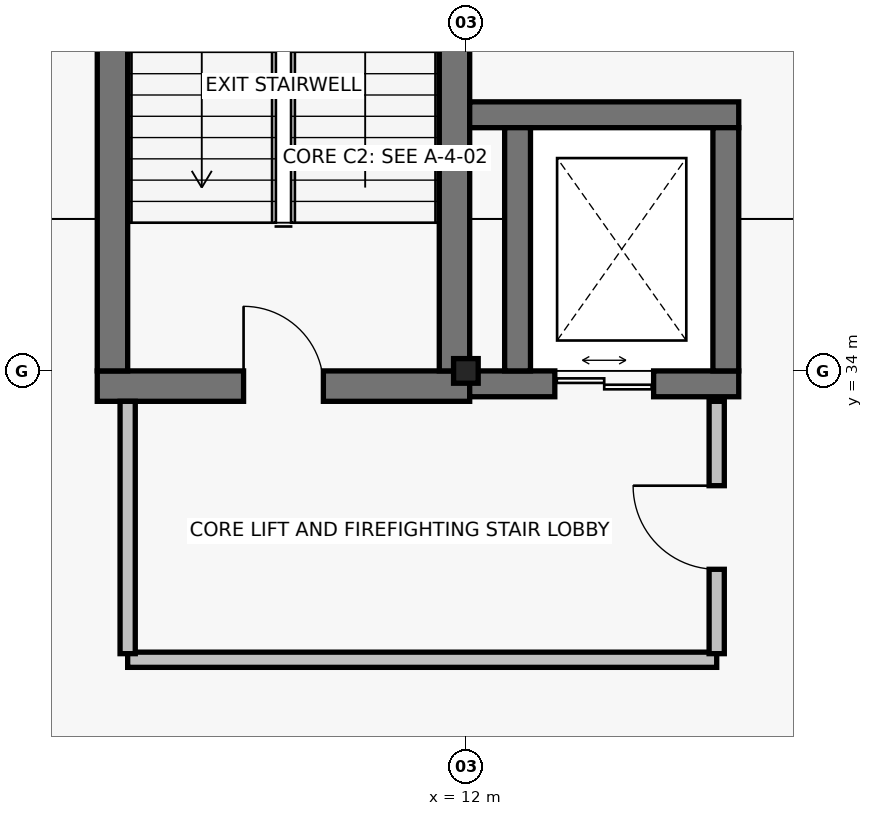
"""IFC4 building model, lengths in metres.
Left out: names, types, materials, properties, quantities, classifications, styles, units other than length and angle.
Written with IfcOpenShell. Run it as: python <this file> out.ifc"""

import sys

from ifc_helpers import new_model, si_unit, direction, frame, frame_2d, origin, origin_2d, place, context, subcontext, project, spatial, rectangle, hollow_circle, extrude, element, fill, save


model = new_model("IFC4")
c1 = context("Model", 3, precision=1e-05, world=origin(), true_north=direction((0.0, 1.0)))
c2 = subcontext(c1, "Body", "Model", "MODEL_VIEW")
j1 = project(units=[si_unit("LENGTHUNIT", "METRE"), si_unit("PLANEANGLEUNIT", "RADIAN")], contexts=[c1])
p1 = place(None, origin())
s1 = spatial("IfcSite", under=j1, at=p1, CompositionType="ELEMENT")
p2 = place(p1, origin())
s2 = spatial("IfcBuilding", under=s1, at=p2, CompositionType="ELEMENT")
p3 = place(p2, frame((0.0, 0.0, 19.4)))
s3 = spatial("IfcBuildingStorey", under=s2, at=p3, CompositionType="ELEMENT", Elevation=19.4)
p4 = place(p3, frame((12.0, 34.0, 0.0), z_axis=(0.0, 0.0, 1.0), x_axis=(1.0, 0.0, 0.0)))
e1 = element("IfcColumn", 1, at=p4, inside=s3, PredefinedType="COLUMN", context=c2, shape_type="SweptSolid", body=[
    extrude(hollow_circle(Radius=0.162, WallThickness=0.013, at=origin_2d()), origin(), (0.0, 0.0, 1.0), 4.2),
])
p5 = place(p3, frame((7.15, 33.8, 0.0), z_axis=(0.0, 0.0, 1.0), x_axis=(1.0, 0.0, 0.0)))
e2 = element("IfcWall", 2, at=p5, inside=s3, PredefinedType="SHEAR", context=c2, shape_type="SweptSolid", body=[
    extrude(rectangle(XDim=4.9, YDim=0.4, at=frame_2d((2.45, 0.0))), origin(), (0.0, 0.0, 1.0), 3.95),
])
p6 = place(p5, frame((1.925, 0.0, 0.0)))
e3 = element("IfcOpeningElement", 3, at=p6, cuts=e2, PredefinedType="OPENING", context=c2, shape_type="SweptSolid", body=[
    extrude(rectangle(XDim=1.05, YDim=2.15, at=frame_2d((0.525, 1.075))), frame((0.0, 0.215, 0.0), z_axis=(0.0, -1.0, 0.0), x_axis=(1.0, 0.0, 0.0)), (0.0, 0.0, 1.0), 0.43),
])
for number, where, z_axis, x_axis in (
    (4, (7.35, 43.4, 0.0), (0.0, 0.0, 1.0), (0.0, -1.0, 0.0)),
    (5, (11.85, 34.0, 0.0), (0.0, 0.0, 1.0), (0.0, 1.0, 0.0)),
):
    element("IfcWall", number, at=place(p3, frame(where, z_axis=z_axis, x_axis=x_axis)), inside=s3, PredefinedType="SHEAR", context=c2, shape_type="SweptSolid", body=[
        extrude(rectangle(XDim=9.4, YDim=0.4, at=frame_2d((4.7, 0.0))), origin(), (0.0, 0.0, 1.0), 3.95),
    ])
p7 = place(p3, frame((12.05, 33.83, 0.0), z_axis=(0.0, 0.0, 1.0), x_axis=(1.0, 0.0, 0.0)))
e6 = element("IfcWall", 6, at=p7, inside=s3, PredefinedType="SHEAR", context=c2, shape_type="SweptSolid", body=[
    extrude(rectangle(XDim=3.54, YDim=0.34, at=frame_2d((1.77, 0.0))), origin(), (0.0, 0.0, 1.0), 3.95),
])
p8 = place(p7, frame((1.12, 0.0, 0.0)))
e7 = element("IfcOpeningElement", 7, at=p8, cuts=e6, PredefinedType="OPENING", context=c2, shape_type="SweptSolid", body=[
    extrude(rectangle(XDim=1.3, YDim=2.25, at=frame_2d((0.65, 1.125))), frame((0.0, 0.185, 0.0), z_axis=(0.0, -1.0, 0.0), x_axis=(1.0, 0.0, 0.0)), (0.0, 0.0, 1.0), 0.37),
])
p9 = place(p3, frame((15.59, 37.37, 0.0), z_axis=(0.0, 0.0, 1.0), x_axis=(-1.0, 0.0, 0.0)))
e8 = element("IfcWall", 8, at=p9, inside=s3, PredefinedType="SHEAR", context=c2, shape_type="SweptSolid", body=[
    extrude(rectangle(XDim=3.54, YDim=0.34, at=frame_2d((1.77, 0.0))), origin(), (0.0, 0.0, 1.0), 3.95),
])
for number, where, z_axis, x_axis in (
    (9, (12.68, 37.2, 0.0), (0.0, 0.0, 1.0), (0.0, -1.0, 0.0)),
    (10, (15.42, 34.0, 0.0), (0.0, 0.0, 1.0), (0.0, 1.0, 0.0)),
):
    element("IfcWall", number, at=place(p3, frame(where, z_axis=z_axis, x_axis=x_axis)), inside=s3, PredefinedType="SHEAR", context=c2, shape_type="SweptSolid", body=[
        extrude(rectangle(XDim=3.2, YDim=0.34, at=frame_2d((1.6, 0.0))), origin(), (0.0, 0.0, 1.0), 3.95),
    ])
p10 = place(p3, frame((7.55, 30.2, 0.0), z_axis=(0.0, 0.0, 1.0), x_axis=(1.0, 0.0, 0.0)))
e11 = element("IfcWall", 11, at=p10, inside=s3, PredefinedType="PARTITIONING", context=c2, shape_type="SweptSolid", body=[
    extrude(rectangle(XDim=7.75, YDim=0.2, at=frame_2d((3.875, 0.0))), origin(), (0.0, 0.0, 1.0), 3.496),
])
p11 = place(p3, frame((7.55, 33.6, 0.0), z_axis=(0.0, 0.0, 1.0), x_axis=(0.0, -1.0, 0.0)))
e12 = element("IfcWall", 12, at=p11, inside=s3, PredefinedType="PARTITIONING", context=c2, shape_type="SweptSolid", body=[
    extrude(rectangle(XDim=3.32, YDim=0.2, at=frame_2d((1.66, 0.0))), origin(), (0.0, 0.0, 1.0), 3.88),
])
p12 = place(p3, frame((15.3, 30.28, 0.0), z_axis=(0.0, 0.0, 1.0), x_axis=(0.0, 1.0, 0.0)))
e13 = element("IfcWall", 13, at=p12, inside=s3, PredefinedType="PARTITIONING", context=c2, shape_type="SweptSolid", body=[
    extrude(rectangle(XDim=3.32, YDim=0.2, at=frame_2d((1.66, 0.0))), origin(), (0.0, 0.0, 1.0), 3.88),
])
p13 = place(p12, frame((1.11, 0.0, 0.0)))
e14 = element("IfcOpeningElement", 14, at=p13, cuts=e13, PredefinedType="OPENING", context=c2, shape_type="SweptSolid", body=[
    extrude(rectangle(XDim=1.1, YDim=2.15, at=frame_2d((0.55, 1.075))), frame((0.0, 0.115, 0.0), z_axis=(0.0, -1.0, 0.0), x_axis=(1.0, 0.0, 0.0)), (0.0, 0.0, 1.0), 0.23),
])
p14 = place(p6, origin())
e15 = element("IfcDoor", 15, at=p14, inside=s3, OperationType="SINGLE_SWING_LEFT", PredefinedType="DOOR", context=c2, shape_type="SweptSolid", body=[
    extrude(rectangle(XDim=1.05, YDim=2.15, at=frame_2d((0.525, 1.075))), frame((0.0, 0.025, 0.0), z_axis=(0.0, -1.0, 0.0), x_axis=(1.0, 0.0, 0.0)), (0.0, 0.0, 1.0), 0.05),
])
fill(e3, e15)
p15 = place(p8, origin())
e16 = element("IfcDoor", 16, at=p15, inside=s3, OperationType="DOUBLE_DOOR_SLIDING", PredefinedType="DOOR", context=c2, shape_type="SweptSolid", body=[
    extrude(rectangle(XDim=1.3, YDim=2.25, at=frame_2d((0.65, 1.125))), frame((0.0, 0.025, 0.0), z_axis=(0.0, -1.0, 0.0), x_axis=(1.0, 0.0, 0.0)), (0.0, 0.0, 1.0), 0.05),
])
fill(e7, e16)
p16 = place(p13, origin())
e17 = element("IfcDoor", 17, at=p16, inside=s3, OperationType="SINGLE_SWING_RIGHT", PredefinedType="DOOR", context=c2, shape_type="SweptSolid", body=[
    extrude(rectangle(XDim=1.1, YDim=2.15, at=frame_2d((0.55, 1.075))), frame((0.0, 0.025, 0.0), z_axis=(0.0, -1.0, 0.0), x_axis=(1.0, 0.0, 0.0)), (0.0, 0.0, 1.0), 0.05),
])
fill(e14, e17)
save(model, sys.argv[1])
